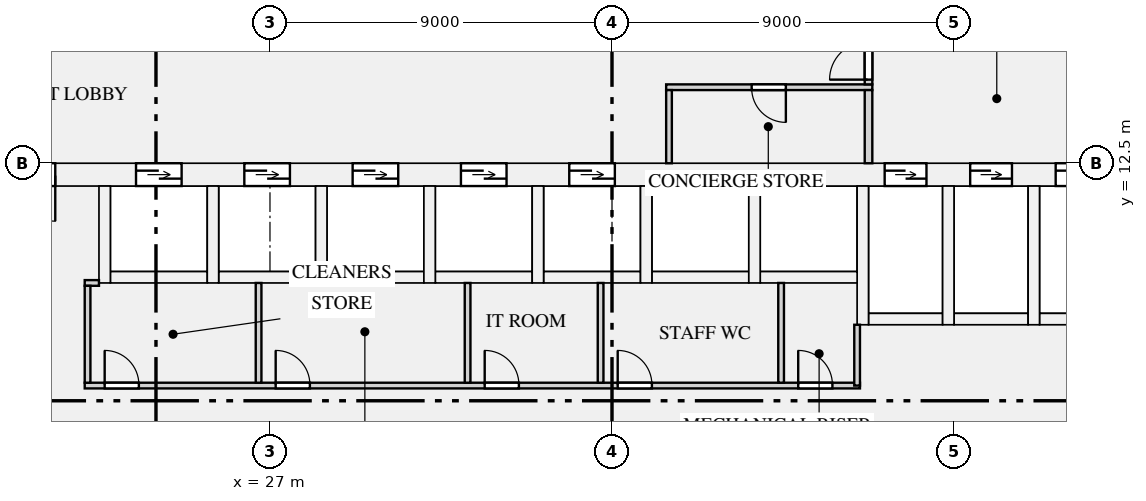
"""IFC4 building model, lengths in metres.
Left out: names, types, materials, properties, quantities, classifications, styles, units other than length and angle.
Written with IfcOpenShell. Run it as: python <this file> out.ifc"""

import sys

from ifc_helpers import new_model, si_unit, direction, frame, frame_2d, origin, place, context, subcontext, project, spatial, rectangle, extrude, element, fill, save


model = new_model("IFC4")
c1 = context("Model", 3, precision=1e-05, world=origin(), true_north=direction((0.0, 1.0)))
c2 = subcontext(c1, "Body", "Model", "MODEL_VIEW")
j1 = project(units=[si_unit("LENGTHUNIT", "METRE"), si_unit("PLANEANGLEUNIT", "RADIAN")], contexts=[c1])
p1 = place(None, origin())
s1 = spatial("IfcSite", under=j1, at=p1, CompositionType="ELEMENT")
p2 = place(p1, origin())
s2 = spatial("IfcBuilding", under=s1, at=p2, CompositionType="ELEMENT")
p3 = place(p2, frame((0.0, 0.0, 6.5)))
s3 = spatial("IfcBuildingStorey", under=s2, at=p3, CompositionType="ELEMENT", Elevation=6.5)
p4 = place(p3, frame((19.0, 12.2, 0.0), z_axis=(0.0, 0.0, 1.0), x_axis=(1.0, 0.0, 0.0)))
e1 = element("IfcWall", 1, at=p4, inside=s3, PredefinedType="SHEAR", context=c2, shape_type="SweptSolid", body=[
    extrude(rectangle(XDim=34.0, YDim=0.6, at=frame_2d((17.0, 0.0))), origin(), (0.0, 0.0, 1.0), 4.5),
])
p5 = place(p4, frame((4.475, 0.0, 0.0)))
e2 = element("IfcOpeningElement", 2, at=p5, cuts=e1, PredefinedType="OPENING", context=c2, shape_type="SweptSolid", body=[
    extrude(rectangle(XDim=1.2, YDim=2.1, at=frame_2d((0.6, 1.05))), frame((0.0, 0.31, 0.0), z_axis=(0.0, -1.0, 0.0), x_axis=(1.0, 0.0, 0.0)), (0.0, 0.0, 1.0), 0.62),
])
p6 = place(p4, frame((7.325, 0.0, 0.0)))
e3 = element("IfcOpeningElement", 3, at=p6, cuts=e1, PredefinedType="OPENING", context=c2, shape_type="SweptSolid", body=[
    extrude(rectangle(XDim=1.2, YDim=2.1, at=frame_2d((0.6, 1.05))), frame((0.0, 0.31, 0.0), z_axis=(0.0, -1.0, 0.0), x_axis=(1.0, 0.0, 0.0)), (0.0, 0.0, 1.0), 0.62),
])
p7 = place(p4, frame((10.175, 0.0, 0.0)))
e4 = element("IfcOpeningElement", 4, at=p7, cuts=e1, PredefinedType="OPENING", context=c2, shape_type="SweptSolid", body=[
    extrude(rectangle(XDim=1.2, YDim=2.1, at=frame_2d((0.6, 1.05))), frame((0.0, 0.31, 0.0), z_axis=(0.0, -1.0, 0.0), x_axis=(1.0, 0.0, 0.0)), (0.0, 0.0, 1.0), 0.62),
])
p8 = place(p4, frame((13.025, 0.0, 0.0)))
e5 = element("IfcOpeningElement", 5, at=p8, cuts=e1, PredefinedType="OPENING", context=c2, shape_type="SweptSolid", body=[
    extrude(rectangle(XDim=1.2, YDim=2.1, at=frame_2d((0.6, 1.05))), frame((0.0, 0.31, 0.0), z_axis=(0.0, -1.0, 0.0), x_axis=(1.0, 0.0, 0.0)), (0.0, 0.0, 1.0), 0.62),
])
p9 = place(p4, frame((15.875, 0.0, 0.0)))
e6 = element("IfcOpeningElement", 6, at=p9, cuts=e1, PredefinedType="OPENING", context=c2, shape_type="SweptSolid", body=[
    extrude(rectangle(XDim=1.2, YDim=2.1, at=frame_2d((0.6, 1.05))), frame((0.0, 0.31, 0.0), z_axis=(0.0, -1.0, 0.0), x_axis=(1.0, 0.0, 0.0)), (0.0, 0.0, 1.0), 0.62),
])
p10 = place(p4, frame((24.175, 0.0, 0.0)))
e7 = element("IfcOpeningElement", 7, at=p10, cuts=e1, PredefinedType="OPENING", context=c2, shape_type="SweptSolid", body=[
    extrude(rectangle(XDim=1.1, YDim=2.1, at=frame_2d((0.55, 1.05))), frame((0.0, 0.31, 0.0), z_axis=(0.0, -1.0, 0.0), x_axis=(1.0, 0.0, 0.0)), (0.0, 0.0, 1.0), 0.62),
])
p11 = place(p4, frame((26.425, 0.0, 0.0)))
e8 = element("IfcOpeningElement", 8, at=p11, cuts=e1, PredefinedType="OPENING", context=c2, shape_type="SweptSolid", body=[
    extrude(rectangle(XDim=1.1, YDim=2.1, at=frame_2d((0.55, 1.05))), frame((0.0, 0.31, 0.0), z_axis=(0.0, -1.0, 0.0), x_axis=(1.0, 0.0, 0.0)), (0.0, 0.0, 1.0), 0.62),
])
p12 = place(p4, frame((28.675, 0.0, 0.0)))
e9 = element("IfcOpeningElement", 9, at=p12, cuts=e1, PredefinedType="OPENING", context=c2, shape_type="SweptSolid", body=[
    extrude(rectangle(XDim=1.1, YDim=2.1, at=frame_2d((0.55, 1.05))), frame((0.0, 0.31, 0.0), z_axis=(0.0, -1.0, 0.0), x_axis=(1.0, 0.0, 0.0)), (0.0, 0.0, 1.0), 0.62),
])
p13 = place(p4, frame((1.15, 0.0, 0.0)))
e10 = element("IfcOpeningElement", 10, at=p13, cuts=e1, PredefinedType="OPENING", context=c2, shape_type="SweptSolid", body=[
    extrude(rectangle(XDim=1.2, YDim=2.1, at=frame_2d((0.6, 1.05))), frame((0.0, 0.31, 0.0), z_axis=(0.0, -1.0, 0.0), x_axis=(1.0, 0.0, 0.0)), (0.0, 0.0, 1.0), 0.62),
])
p14 = place(p4, frame((31.65, 0.0, 0.0)))
e11 = element("IfcOpeningElement", 11, at=p14, cuts=e1, PredefinedType="OPENING", context=c2, shape_type="SweptSolid", body=[
    extrude(rectangle(XDim=1.2, YDim=2.1, at=frame_2d((0.6, 1.05))), frame((0.0, 0.31, 0.0), z_axis=(0.0, -1.0, 0.0), x_axis=(1.0, 0.0, 0.0)), (0.0, 0.0, 1.0), 0.62),
])
p15 = place(p3, frame((22.8, 9.5, 0.0), z_axis=(0.0, 0.0, 1.0), x_axis=(1.0, 0.0, 0.0)))
e12 = element("IfcWall", 12, at=p15, inside=s3, PredefinedType="SHEAR", context=c2, shape_type="SweptSolid", body=[
    extrude(rectangle(XDim=2.55, YDim=0.3, at=frame_2d((1.275, 0.0))), origin(), (0.0, 0.0, 1.0), 4.5),
])
p16 = place(p3, frame((22.65, 9.35, 0.0), z_axis=(0.0, 0.0, 1.0), x_axis=(0.0, 1.0, 0.0)))
e13 = element("IfcWall", 13, at=p16, inside=s3, PredefinedType="SHEAR", context=c2, shape_type="SweptSolid", body=[
    extrude(rectangle(XDim=2.55, YDim=0.3, at=frame_2d((1.275, 0.0))), origin(), (0.0, 0.0, 1.0), 4.5),
])
p17 = place(p3, frame((25.65, 9.5, 0.0), z_axis=(0.0, 0.0, 1.0), x_axis=(1.0, 0.0, 0.0)))
e14 = element("IfcWall", 14, at=p17, inside=s3, PredefinedType="SHEAR", context=c2, shape_type="SweptSolid", body=[
    extrude(rectangle(XDim=2.55, YDim=0.3, at=frame_2d((1.275, 0.0))), origin(), (0.0, 0.0, 1.0), 4.5),
])
p18 = place(p3, frame((25.5, 9.35, 0.0), z_axis=(0.0, 0.0, 1.0), x_axis=(0.0, 1.0, 0.0)))
e15 = element("IfcWall", 15, at=p18, inside=s3, PredefinedType="SHEAR", context=c2, shape_type="SweptSolid", body=[
    extrude(rectangle(XDim=2.55, YDim=0.3, at=frame_2d((1.275, 0.0))), origin(), (0.0, 0.0, 1.0), 4.5),
])
p19 = place(p3, frame((28.5, 9.5, 0.0), z_axis=(0.0, 0.0, 1.0), x_axis=(1.0, 0.0, 0.0)))
e16 = element("IfcWall", 16, at=p19, inside=s3, PredefinedType="SHEAR", context=c2, shape_type="SweptSolid", body=[
    extrude(rectangle(XDim=2.55, YDim=0.3, at=frame_2d((1.275, 0.0))), origin(), (0.0, 0.0, 1.0), 4.5),
])
for number, where, z_axis, x_axis in (
    (17, (28.35, 9.35, 0.0), (0.0, 0.0, 1.0), (0.0, 1.0, 0.0)),
    (18, (31.35, 9.5, 0.0), (0.0, 0.0, 1.0), (1.0, 0.0, 0.0)),
    (19, (31.2, 9.35, 0.0), (0.0, 0.0, 1.0), (0.0, 1.0, 0.0)),
):
    element("IfcWall", number, at=place(p3, frame(where, z_axis=z_axis, x_axis=x_axis)), inside=s3, PredefinedType="SHEAR", context=c2, shape_type="SweptSolid", body=[
        extrude(rectangle(XDim=2.55, YDim=0.3, at=frame_2d((1.275, 0.0))), origin(), (0.0, 0.0, 1.0), 4.5),
    ])
p20 = place(p3, frame((34.2, 9.5, 0.0), z_axis=(0.0, 0.0, 1.0), x_axis=(1.0, 0.0, 0.0)))
e20 = element("IfcWall", 20, at=p20, inside=s3, PredefinedType="SHEAR", context=c2, shape_type="SweptSolid", body=[
    extrude(rectangle(XDim=2.55, YDim=0.3, at=frame_2d((1.275, 0.0))), origin(), (0.0, 0.0, 1.0), 4.5),
])
p21 = place(p3, frame((34.05, 9.35, 0.0), z_axis=(0.0, 0.0, 1.0), x_axis=(0.0, 1.0, 0.0)))
e21 = element("IfcWall", 21, at=p21, inside=s3, PredefinedType="SHEAR", context=c2, shape_type="SweptSolid", body=[
    extrude(rectangle(XDim=2.55, YDim=0.3, at=frame_2d((1.275, 0.0))), origin(), (0.0, 0.0, 1.0), 4.5),
])
p22 = place(p3, frame((37.05, 9.5, 0.0), z_axis=(0.0, 0.0, 1.0), x_axis=(1.0, 0.0, 0.0)))
e22 = element("IfcWall", 22, at=p22, inside=s3, PredefinedType="SHEAR", context=c2, shape_type="SweptSolid", body=[
    extrude(rectangle(XDim=2.55, YDim=0.3, at=frame_2d((1.275, 0.0))), origin(), (0.0, 0.0, 1.0), 4.5),
])
p23 = place(p3, frame((36.9, 9.35, 0.0), z_axis=(0.0, 0.0, 1.0), x_axis=(0.0, 1.0, 0.0)))
e23 = element("IfcWall", 23, at=p23, inside=s3, PredefinedType="SHEAR", context=c2, shape_type="SweptSolid", body=[
    extrude(rectangle(XDim=2.55, YDim=0.3, at=frame_2d((1.275, 0.0))), origin(), (0.0, 0.0, 1.0), 4.5),
])
p24 = place(p3, frame((39.9, 9.5, 0.0), z_axis=(0.0, 0.0, 1.0), x_axis=(1.0, 0.0, 0.0)))
e24 = element("IfcWall", 24, at=p24, inside=s3, PredefinedType="SHEAR", context=c2, shape_type="SweptSolid", body=[
    extrude(rectangle(XDim=2.55, YDim=0.3, at=frame_2d((1.275, 0.0))), origin(), (0.0, 0.0, 1.0), 4.5),
])
p25 = place(p3, frame((39.75, 9.35, 0.0), z_axis=(0.0, 0.0, 1.0), x_axis=(0.0, 1.0, 0.0)))
e25 = element("IfcWall", 25, at=p25, inside=s3, PredefinedType="SHEAR", context=c2, shape_type="SweptSolid", body=[
    extrude(rectangle(XDim=2.55, YDim=0.3, at=frame_2d((1.275, 0.0))), origin(), (0.0, 0.0, 1.0), 4.5),
])
p26 = place(p3, frame((42.75, 8.4, 0.0), z_axis=(0.0, 0.0, 1.0), x_axis=(1.0, 0.0, 0.0)))
e26 = element("IfcWall", 26, at=p26, inside=s3, PredefinedType="SHEAR", context=c2, shape_type="SweptSolid", body=[
    extrude(rectangle(XDim=1.95, YDim=0.3, at=frame_2d((0.975, 0.0))), origin(), (0.0, 0.0, 1.0), 4.5),
])
p27 = place(p3, frame((42.6, 8.25, 0.0), z_axis=(0.0, 0.0, 1.0), x_axis=(0.0, 1.0, 0.0)))
e27 = element("IfcWall", 27, at=p27, inside=s3, PredefinedType="SHEAR", context=c2, shape_type="SweptSolid", body=[
    extrude(rectangle(XDim=3.65, YDim=0.3, at=frame_2d((1.825, 0.0))), origin(), (0.0, 0.0, 1.0), 4.5),
])
p28 = place(p3, frame((45.0, 8.4, 0.0), z_axis=(0.0, 0.0, 1.0), x_axis=(1.0, 0.0, 0.0)))
e28 = element("IfcWall", 28, at=p28, inside=s3, PredefinedType="SHEAR", context=c2, shape_type="SweptSolid", body=[
    extrude(rectangle(XDim=1.95, YDim=0.3, at=frame_2d((0.975, 0.0))), origin(), (0.0, 0.0, 1.0), 4.5),
])
p29 = place(p3, frame((44.85, 8.25, 0.0), z_axis=(0.0, 0.0, 1.0), x_axis=(0.0, 1.0, 0.0)))
e29 = element("IfcWall", 29, at=p29, inside=s3, PredefinedType="SHEAR", context=c2, shape_type="SweptSolid", body=[
    extrude(rectangle(XDim=3.65, YDim=0.3, at=frame_2d((1.825, 0.0))), origin(), (0.0, 0.0, 1.0), 4.5),
])
p30 = place(p3, frame((47.25, 8.4, 0.0), z_axis=(0.0, 0.0, 1.0), x_axis=(1.0, 0.0, 0.0)))
e30 = element("IfcWall", 30, at=p30, inside=s3, PredefinedType="SHEAR", context=c2, shape_type="SweptSolid", body=[
    extrude(rectangle(XDim=1.95, YDim=0.3, at=frame_2d((0.975, 0.0))), origin(), (0.0, 0.0, 1.0), 4.5),
])
p31 = place(p3, frame((47.1, 8.25, 0.0), z_axis=(0.0, 0.0, 1.0), x_axis=(0.0, 1.0, 0.0)))
e31 = element("IfcWall", 31, at=p31, inside=s3, PredefinedType="SHEAR", context=c2, shape_type="SweptSolid", body=[
    extrude(rectangle(XDim=3.65, YDim=0.3, at=frame_2d((1.825, 0.0))), origin(), (0.0, 0.0, 1.0), 4.5),
])
p32 = place(p3, frame((22.125, 6.65, 0.0), z_axis=(0.0, 0.0, 1.0), x_axis=(1.0, 0.0, 0.0)))
e32 = element("IfcWall", 32, at=p32, inside=s3, PredefinedType="PARTITIONING", context=c2, shape_type="SweptSolid", body=[
    extrude(rectangle(XDim=20.4, YDim=0.15, at=frame_2d((10.2, 0.0))), origin(), (0.0, 0.0, 1.0), 4.098),
])
p33 = place(p32, frame((0.525, 0.0, 0.0)))
e33 = element("IfcOpeningElement", 33, at=p33, cuts=e32, PredefinedType="OPENING", context=c2, shape_type="SweptSolid", body=[
    extrude(rectangle(XDim=0.9, YDim=2.1, at=frame_2d((0.45, 1.05))), frame((0.0, 0.085, 0.0), z_axis=(0.0, -1.0, 0.0), x_axis=(1.0, 0.0, 0.0)), (0.0, 0.0, 1.0), 0.17),
])
p34 = place(p32, frame((5.025, 0.0, 0.0)))
e34 = element("IfcOpeningElement", 34, at=p34, cuts=e32, PredefinedType="OPENING", context=c2, shape_type="SweptSolid", body=[
    extrude(rectangle(XDim=0.9, YDim=2.1, at=frame_2d((0.45, 1.05))), frame((0.0, 0.085, 0.0), z_axis=(0.0, -1.0, 0.0), x_axis=(1.0, 0.0, 0.0)), (0.0, 0.0, 1.0), 0.17),
])
p35 = place(p32, frame((10.525, 0.0, 0.0)))
e35 = element("IfcOpeningElement", 35, at=p35, cuts=e32, PredefinedType="OPENING", context=c2, shape_type="SweptSolid", body=[
    extrude(rectangle(XDim=0.9, YDim=2.1, at=frame_2d((0.45, 1.05))), frame((0.0, 0.085, 0.0), z_axis=(0.0, -1.0, 0.0), x_axis=(1.0, 0.0, 0.0)), (0.0, 0.0, 1.0), 0.17),
])
p36 = place(p32, frame((14.025, 0.0, 0.0)))
e36 = element("IfcOpeningElement", 36, at=p36, cuts=e32, PredefinedType="OPENING", context=c2, shape_type="SweptSolid", body=[
    extrude(rectangle(XDim=0.9, YDim=2.1, at=frame_2d((0.45, 1.05))), frame((0.0, 0.085, 0.0), z_axis=(0.0, -1.0, 0.0), x_axis=(1.0, 0.0, 0.0)), (0.0, 0.0, 1.0), 0.17),
])
p37 = place(p32, frame((18.775, 0.0, 0.0)))
e37 = element("IfcOpeningElement", 37, at=p37, cuts=e32, PredefinedType="OPENING", context=c2, shape_type="SweptSolid", body=[
    extrude(rectangle(XDim=0.9, YDim=2.1, at=frame_2d((0.45, 1.05))), frame((0.0, 0.085, 0.0), z_axis=(0.0, -1.0, 0.0), x_axis=(1.0, 0.0, 0.0)), (0.0, 0.0, 1.0), 0.17),
])
p38 = place(p3, frame((22.125, 9.35, 0.0), z_axis=(0.0, 0.0, 1.0), x_axis=(1.0, 0.0, 0.0)))
e38 = element("IfcWall", 38, at=p38, inside=s3, PredefinedType="PARTITIONING", context=c2, shape_type="SweptSolid", body=[
    extrude(rectangle(XDim=0.375, YDim=0.15, at=frame_2d((0.188, 0.0))), origin(), (0.0, 0.0, 1.0), 4.098),
])
p39 = place(p3, frame((37.425, 14.5, 0.0), z_axis=(0.0, 0.0, 1.0), x_axis=(1.0, 0.0, 0.0)))
e39 = element("IfcWall", 39, at=p39, inside=s3, PredefinedType="PARTITIONING", context=c2, shape_type="SweptSolid", body=[
    extrude(rectangle(XDim=5.425, YDim=0.15, at=frame_2d((2.712, 0.0))), origin(), (0.0, 0.0, 1.0), 4.098),
])
p40 = place(p39, frame((2.25, 0.0, 0.0)))
e40 = element("IfcOpeningElement", 40, at=p40, cuts=e39, PredefinedType="OPENING", context=c2, shape_type="SweptSolid", body=[
    extrude(rectangle(XDim=0.9, YDim=2.1, at=frame_2d((0.45, 1.05))), frame((0.0, 0.085, 0.0), z_axis=(0.0, -1.0, 0.0), x_axis=(1.0, 0.0, 0.0)), (0.0, 0.0, 1.0), 0.17),
])
p41 = place(p3, frame((42.45, 6.65, 0.0), z_axis=(0.0, 0.0, 1.0), x_axis=(0.0, 1.0, 0.0)))
e41 = element("IfcWall", 41, at=p41, inside=s3, PredefinedType="PARTITIONING", context=c2, shape_type="SweptSolid", body=[
    extrude(rectangle(XDim=1.6, YDim=0.15, at=frame_2d((0.8, 0.0))), origin(), (0.0, 0.0, 1.0), 4.098),
])
p42 = place(p3, frame((22.2, 6.725, 0.0), z_axis=(0.0, 0.0, 1.0), x_axis=(0.0, 1.0, 0.0)))
e42 = element("IfcWall", 42, at=p42, inside=s3, PredefinedType="PARTITIONING", context=c2, shape_type="SweptSolid", body=[
    extrude(rectangle(XDim=2.55, YDim=0.15, at=frame_2d((1.275, 0.0))), origin(), (0.0, 0.0, 1.0), 4.098),
])
for number, where, z_axis, x_axis in (
    (43, (26.7, 6.725, 0.0), (0.0, 0.0, 1.0), (0.0, 1.0, 0.0)),
    (44, (32.2, 6.725, 0.0), (0.0, 0.0, 1.0), (0.0, 1.0, 0.0)),
    (45, (35.7, 6.725, 0.0), (0.0, 0.0, 1.0), (0.0, 1.0, 0.0)),
    (46, (40.45, 6.725, 0.0), (0.0, 0.0, 1.0), (0.0, 1.0, 0.0)),
):
    element("IfcWall", number, at=place(p3, frame(where, z_axis=z_axis, x_axis=x_axis)), inside=s3, PredefinedType="PARTITIONING", context=c2, shape_type="SweptSolid", body=[
        extrude(rectangle(XDim=2.625, YDim=0.15, at=frame_2d((1.312, 0.0))), origin(), (0.0, 0.0, 1.0), 4.098),
    ])
p43 = place(p3, frame((37.5, 12.5, 0.0), z_axis=(0.0, 0.0, 1.0), x_axis=(0.0, 1.0, 0.0)))
e47 = element("IfcWall", 47, at=p43, inside=s3, PredefinedType="PARTITIONING", context=c2, shape_type="SweptSolid", body=[
    extrude(rectangle(XDim=1.925, YDim=0.15, at=frame_2d((0.962, 0.0))), origin(), (0.0, 0.0, 1.0), 4.098),
])
p44 = place(p3, frame((42.75, 12.5, 0.0), z_axis=(0.0, 0.0, 1.0), x_axis=(0.0, 1.0, 0.0)))
e48 = element("IfcWall", 48, at=p44, inside=s3, PredefinedType="PARTITIONING", context=c2, shape_type="SweptSolid", body=[
    extrude(rectangle(XDim=1.925, YDim=0.2, at=frame_2d((0.962, 0.0))), origin(), (0.0, 0.0, 1.0), 4.098),
])
p45 = place(p3, frame((42.75, 14.575, 0.0), z_axis=(0.0, 0.0, 1.0), x_axis=(0.0, 1.0, 0.0)))
e49 = element("IfcWall", 49, at=p45, inside=s3, PredefinedType="PARTITIONING", context=c2, shape_type="SweptSolid", body=[
    extrude(rectangle(XDim=1.325, YDim=0.2, at=frame_2d((0.663, 0.0))), origin(), (0.0, 0.0, 1.0), 4.098),
])
p46 = place(p45, frame((0.125, 0.0, 0.0)))
e50 = element("IfcOpeningElement", 50, at=p46, cuts=e49, PredefinedType="OPENING", context=c2, shape_type="SweptSolid", body=[
    extrude(rectangle(XDim=1.0, YDim=2.1, at=frame_2d((0.5, 1.05))), frame((0.0, 0.11, 0.0), z_axis=(0.0, -1.0, 0.0), x_axis=(1.0, 0.0, 0.0)), (0.0, 0.0, 1.0), 0.22),
])
p47 = place(p5, origin())
e51 = element("IfcDoor", 51, at=p47, inside=s3, OperationType="DOUBLE_DOOR_SLIDING", PredefinedType="DOOR", context=c2, shape_type="SweptSolid", body=[
    extrude(rectangle(XDim=1.2, YDim=2.1, at=frame_2d((0.6, 1.05))), frame((0.0, 0.025, 0.0), z_axis=(0.0, -1.0, 0.0), x_axis=(1.0, 0.0, 0.0)), (0.0, 0.0, 1.0), 0.05),
])
fill(e2, e51)
p48 = place(p6, origin())
e52 = element("IfcDoor", 52, at=p48, inside=s3, OperationType="DOUBLE_DOOR_SLIDING", PredefinedType="DOOR", context=c2, shape_type="SweptSolid", body=[
    extrude(rectangle(XDim=1.2, YDim=2.1, at=frame_2d((0.6, 1.05))), frame((0.0, 0.025, 0.0), z_axis=(0.0, -1.0, 0.0), x_axis=(1.0, 0.0, 0.0)), (0.0, 0.0, 1.0), 0.05),
])
fill(e3, e52)
p49 = place(p7, origin())
e53 = element("IfcDoor", 53, at=p49, inside=s3, OperationType="DOUBLE_DOOR_SLIDING", PredefinedType="DOOR", context=c2, shape_type="SweptSolid", body=[
    extrude(rectangle(XDim=1.2, YDim=2.1, at=frame_2d((0.6, 1.05))), frame((0.0, 0.025, 0.0), z_axis=(0.0, -1.0, 0.0), x_axis=(1.0, 0.0, 0.0)), (0.0, 0.0, 1.0), 0.05),
])
fill(e4, e53)
p50 = place(p8, origin())
e54 = element("IfcDoor", 54, at=p50, inside=s3, OperationType="DOUBLE_DOOR_SLIDING", PredefinedType="DOOR", context=c2, shape_type="SweptSolid", body=[
    extrude(rectangle(XDim=1.2, YDim=2.1, at=frame_2d((0.6, 1.05))), frame((0.0, 0.025, 0.0), z_axis=(0.0, -1.0, 0.0), x_axis=(1.0, 0.0, 0.0)), (0.0, 0.0, 1.0), 0.05),
])
fill(e5, e54)
p51 = place(p9, origin())
e55 = element("IfcDoor", 55, at=p51, inside=s3, OperationType="DOUBLE_DOOR_SLIDING", PredefinedType="DOOR", context=c2, shape_type="SweptSolid", body=[
    extrude(rectangle(XDim=1.2, YDim=2.1, at=frame_2d((0.6, 1.05))), frame((0.0, 0.025, 0.0), z_axis=(0.0, -1.0, 0.0), x_axis=(1.0, 0.0, 0.0)), (0.0, 0.0, 1.0), 0.05),
])
fill(e6, e55)
p52 = place(p10, origin())
e56 = element("IfcDoor", 56, at=p52, inside=s3, OperationType="DOUBLE_DOOR_SLIDING", PredefinedType="DOOR", context=c2, shape_type="SweptSolid", body=[
    extrude(rectangle(XDim=1.1, YDim=2.1, at=frame_2d((0.55, 1.05))), frame((0.0, 0.025, 0.0), z_axis=(0.0, -1.0, 0.0), x_axis=(1.0, 0.0, 0.0)), (0.0, 0.0, 1.0), 0.05),
])
fill(e7, e56)
p53 = place(p11, origin())
e57 = element("IfcDoor", 57, at=p53, inside=s3, OperationType="DOUBLE_DOOR_SLIDING", PredefinedType="DOOR", context=c2, shape_type="SweptSolid", body=[
    extrude(rectangle(XDim=1.1, YDim=2.1, at=frame_2d((0.55, 1.05))), frame((0.0, 0.025, 0.0), z_axis=(0.0, -1.0, 0.0), x_axis=(1.0, 0.0, 0.0)), (0.0, 0.0, 1.0), 0.05),
])
fill(e8, e57)
p54 = place(p12, origin())
e58 = element("IfcDoor", 58, at=p54, inside=s3, OperationType="DOUBLE_DOOR_SLIDING", PredefinedType="DOOR", context=c2, shape_type="SweptSolid", body=[
    extrude(rectangle(XDim=1.1, YDim=2.1, at=frame_2d((0.55, 1.05))), frame((0.0, 0.025, 0.0), z_axis=(0.0, -1.0, 0.0), x_axis=(1.0, 0.0, 0.0)), (0.0, 0.0, 1.0), 0.05),
])
fill(e9, e58)
p55 = place(p33, origin())
e59 = element("IfcDoor", 59, at=p55, inside=s3, OperationType="SINGLE_SWING_LEFT", PredefinedType="DOOR", context=c2, shape_type="SweptSolid", body=[
    extrude(rectangle(XDim=0.9, YDim=2.1, at=frame_2d((0.45, 1.05))), frame((0.0, 0.025, 0.0), z_axis=(0.0, -1.0, 0.0), x_axis=(1.0, 0.0, 0.0)), (0.0, 0.0, 1.0), 0.05),
])
fill(e33, e59)
p56 = place(p34, origin())
e60 = element("IfcDoor", 60, at=p56, inside=s3, OperationType="SINGLE_SWING_LEFT", PredefinedType="DOOR", context=c2, shape_type="SweptSolid", body=[
    extrude(rectangle(XDim=0.9, YDim=2.1, at=frame_2d((0.45, 1.05))), frame((0.0, 0.025, 0.0), z_axis=(0.0, -1.0, 0.0), x_axis=(1.0, 0.0, 0.0)), (0.0, 0.0, 1.0), 0.05),
])
fill(e34, e60)
p57 = place(p35, origin())
e61 = element("IfcDoor", 61, at=p57, inside=s3, OperationType="SINGLE_SWING_LEFT", PredefinedType="DOOR", context=c2, shape_type="SweptSolid", body=[
    extrude(rectangle(XDim=0.9, YDim=2.1, at=frame_2d((0.45, 1.05))), frame((0.0, 0.025, 0.0), z_axis=(0.0, -1.0, 0.0), x_axis=(1.0, 0.0, 0.0)), (0.0, 0.0, 1.0), 0.05),
])
fill(e35, e61)
p58 = place(p36, origin())
e62 = element("IfcDoor", 62, at=p58, inside=s3, OperationType="SINGLE_SWING_LEFT", PredefinedType="DOOR", context=c2, shape_type="SweptSolid", body=[
    extrude(rectangle(XDim=0.9, YDim=2.1, at=frame_2d((0.45, 1.05))), frame((0.0, 0.025, 0.0), z_axis=(0.0, -1.0, 0.0), x_axis=(1.0, 0.0, 0.0)), (0.0, 0.0, 1.0), 0.05),
])
fill(e36, e62)
p59 = place(p37, origin())
e63 = element("IfcDoor", 63, at=p59, inside=s3, OperationType="SINGLE_SWING_LEFT", PredefinedType="DOOR", context=c2, shape_type="SweptSolid", body=[
    extrude(rectangle(XDim=0.9, YDim=2.1, at=frame_2d((0.45, 1.05))), frame((0.0, 0.025, 0.0), z_axis=(0.0, -1.0, 0.0), x_axis=(1.0, 0.0, 0.0)), (0.0, 0.0, 1.0), 0.05),
])
fill(e37, e63)
p60 = place(p40, frame((0.9, 0.0, 0.0), z_axis=(0.0, 0.0, 1.0), x_axis=(-1.0, 0.0, 0.0)))
e64 = element("IfcDoor", 64, at=p60, inside=s3, OperationType="SINGLE_SWING_LEFT", PredefinedType="DOOR", context=c2, shape_type="SweptSolid", body=[
    extrude(rectangle(XDim=0.9, YDim=2.1, at=frame_2d((0.45, 1.05))), frame((0.0, 0.025, 0.0), z_axis=(0.0, -1.0, 0.0), x_axis=(1.0, 0.0, 0.0)), (0.0, 0.0, 1.0), 0.05),
])
fill(e40, e64)
p61 = place(p13, frame((1.2, 0.0, 0.0), z_axis=(0.0, 0.0, 1.0), x_axis=(-1.0, 0.0, 0.0)))
e65 = element("IfcDoor", 65, at=p61, inside=s3, OperationType="SINGLE_SWING_LEFT", PredefinedType="DOOR", context=c2, shape_type="SweptSolid", body=[
    extrude(rectangle(XDim=1.2, YDim=2.1, at=frame_2d((0.6, 1.05))), frame((0.0, 0.025, 0.0), z_axis=(0.0, -1.0, 0.0), x_axis=(1.0, 0.0, 0.0)), (0.0, 0.0, 1.0), 0.05),
])
fill(e10, e65)
p62 = place(p46, origin())
e66 = element("IfcDoor", 66, at=p62, inside=s3, OperationType="SINGLE_SWING_LEFT", PredefinedType="DOOR", context=c2, shape_type="SweptSolid", body=[
    extrude(rectangle(XDim=1.0, YDim=2.1, at=frame_2d((0.5, 1.05))), frame((0.0, 0.025, 0.0), z_axis=(0.0, -1.0, 0.0), x_axis=(1.0, 0.0, 0.0)), (0.0, 0.0, 1.0), 0.05),
])
fill(e50, e66)
save(model, sys.argv[1])
